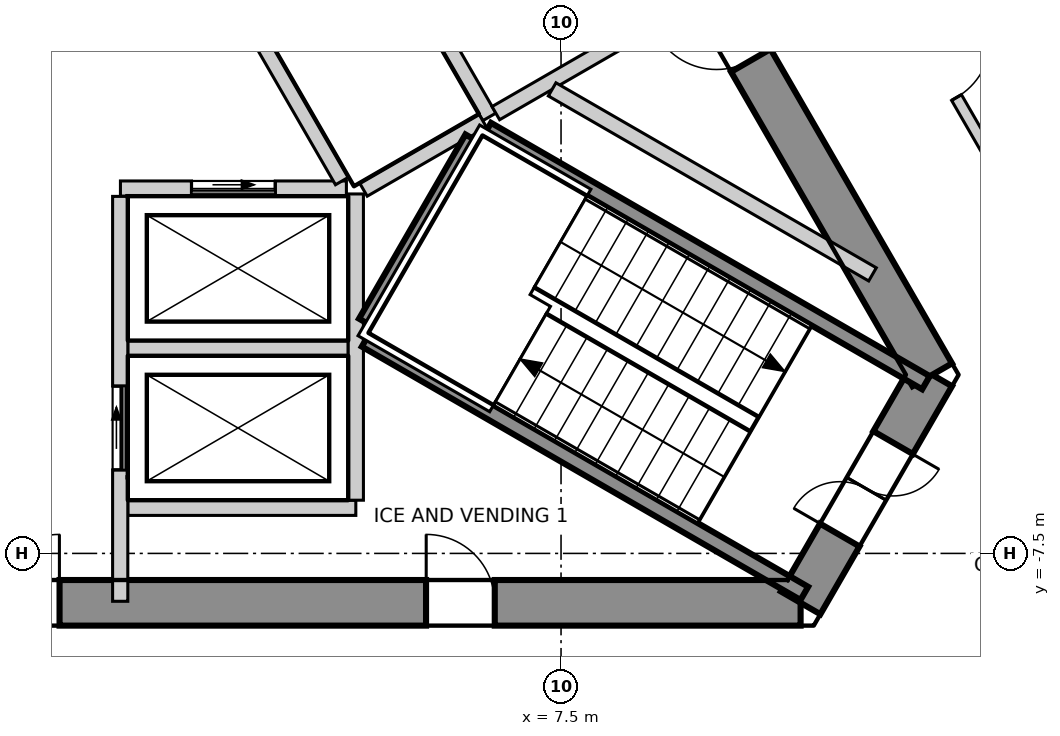
"""IFC4 building model, lengths in metres.
Left out: names, types, materials, properties, quantities, classifications, styles, units other than length and angle.
Written with IfcOpenShell. Run it as: python <this file> out.ifc"""

import sys

from ifc_helpers import new_model, si_unit, direction, frame, frame_2d, origin, place, context, subcontext, project, spatial, polyline, rectangle, outline, extrude, element, fill, save


model = new_model("IFC4")
c1 = context("Model", 3, precision=1e-05, world=origin(), true_north=direction((0.0, 1.0)))
c2 = subcontext(c1, "Body", "Model", "MODEL_VIEW")
j1 = project(units=[si_unit("LENGTHUNIT", "METRE"), si_unit("PLANEANGLEUNIT", "RADIAN")], contexts=[c1])
p1 = place(None, origin())
s1 = spatial("IfcSite", under=j1, at=p1, CompositionType="ELEMENT")
p2 = place(p1, origin())
s2 = spatial("IfcBuilding", under=s1, at=p2, CompositionType="ELEMENT")
p3 = place(p2, frame((0.0, 0.0, 300.7)))
s3 = spatial("IfcBuildingStorey", under=s2, at=p3, CompositionType="ELEMENT", Elevation=300.7)
p4 = place(p3, frame((-10.652, -8.15, -0.3), z_axis=(0.0, 0.0, 1.0), x_axis=(1.0, 0.0, 0.0)))
e1 = element("IfcWall", 1, at=p4, inside=s3, PredefinedType="SHEAR", context=c2, shape_type="SweptSolid", body=[
    extrude(outline(polyline([(-0.173, -0.3), (1.795, -0.3), (3.763, -0.3), (5.731, -0.3), (7.7, -0.3), (9.668, -0.3), (11.636, -0.3), (13.604, -0.3), (15.573, -0.3), (17.541, -0.3), (19.509, -0.3), (21.477, -0.3), (21.131, 0.3), (19.226, 0.3), (17.321, 0.3), (15.415, 0.3), (13.51, 0.3), (11.605, 0.3), (9.699, 0.3), (7.794, 0.3), (5.889, 0.3), (3.984, 0.3), (2.078, 0.3), (0.173, 0.3), (-0.173, -0.3)])), origin(), (0.0, 0.0, 1.0), 3.6),
])
p5 = place(p4, frame((9.752, 0.0, 0.3)))
e2 = element("IfcOpeningElement", 2, at=p5, cuts=e1, PredefinedType="OPENING", context=c2, shape_type="SweptSolid", body=[
    extrude(rectangle(XDim=1.8, YDim=2.1, at=frame_2d((0.9, 1.05))), frame((0.0, 0.31, 0.0), z_axis=(0.0, -1.0, 0.0), x_axis=(1.0, 0.0, 0.0)), (0.0, 0.0, 1.0), 0.62),
])
p6 = place(p4, frame((4.026, 0.0, 0.3)))
e3 = element("IfcOpeningElement", 3, at=p6, cuts=e1, PredefinedType="OPENING", context=c2, shape_type="SweptSolid", body=[
    extrude(rectangle(XDim=0.9, YDim=2.1, at=frame_2d((0.45, 1.05))), frame((0.0, 0.31, 0.0), z_axis=(0.0, -1.0, 0.0), x_axis=(1.0, 0.0, 0.0)), (0.0, 0.0, 1.0), 0.62),
])
p7 = place(p4, frame((16.378, 0.0, 0.3)))
e4 = element("IfcOpeningElement", 4, at=p7, cuts=e1, PredefinedType="OPENING", context=c2, shape_type="SweptSolid", body=[
    extrude(rectangle(XDim=0.9, YDim=2.1, at=frame_2d((0.45, 1.05))), frame((0.0, 0.31, 0.0), z_axis=(0.0, -1.0, 0.0), x_axis=(1.0, 0.0, 0.0)), (0.0, 0.0, 1.0), 0.62),
])
p8 = place(p3, frame((10.652, -8.15, -0.3), z_axis=(0.0, 0.0, 1.0), x_axis=(0.49997462182, 0.866040055388, 0.0)))
e5 = element("IfcWall", 5, at=p8, inside=s3, PredefinedType="SHEAR", context=c2, shape_type="SweptSolid", body=[
    extrude(outline(polyline([(-0.173, -0.3), (1.732, -0.301), (3.638, -0.301), (3.291, 0.3), (1.732, 0.3), (0.173, 0.3), (-0.173, -0.3)])), origin(), (0.0, 0.0, 1.0), 3.6),
])
p9 = place(p8, frame((1.032, 0.0, 0.3)))
e6 = element("IfcOpeningElement", 6, at=p9, cuts=e5, PredefinedType="OPENING", context=c2, shape_type="SweptSolid", body=[
    extrude(rectangle(XDim=1.4, YDim=2.1, at=frame_2d((0.7, 1.05))), frame((0.0, 0.31, 0.0), z_axis=(0.0, -1.0, 0.0), x_axis=(1.0, 0.0, 0.0)), (0.0, 0.0, 1.0), 0.621),
])
p10 = place(p3, frame((12.384, -5.15, -0.3), z_axis=(0.0, 0.0, 1.0), x_axis=(-0.500000539815, 0.866025092122, 0.0)))
e7 = element("IfcWall", 7, at=p10, inside=s3, PredefinedType="SHEAR", context=c2, shape_type="SweptSolid", body=[
    extrude(outline(polyline([(-0.173, -0.301), (1.795, -0.301), (3.763, -0.301), (5.731, -0.301), (7.7, -0.301), (9.668, -0.301), (11.636, -0.301), (13.604, -0.3), (15.573, -0.3), (17.541, -0.3), (19.509, -0.3), (21.477, -0.3), (21.131, 0.3), (19.226, 0.3), (17.321, 0.3), (15.415, 0.3), (13.51, 0.3), (11.605, 0.3), (9.699, 0.3), (7.794, 0.3), (5.889, 0.3), (3.984, 0.3), (2.078, 0.3), (0.173, 0.3), (-0.173, -0.301)])), origin(), (0.0, 0.0, 1.0), 3.6),
])
p11 = place(p10, frame((16.328, 0.0, 0.3)))
e8 = element("IfcOpeningElement", 8, at=p11, cuts=e7, PredefinedType="OPENING", context=c2, shape_type="SweptSolid", body=[
    extrude(rectangle(XDim=1.0, YDim=2.1, at=frame_2d((0.5, 1.05))), frame((0.0, 0.31, 0.0), z_axis=(0.0, -1.0, 0.0), x_axis=(1.0, 0.0, 0.0)), (0.0, 0.0, 1.0), 0.621),
])
p12 = place(p10, frame((4.777, 0.0, 0.3)))
e9 = element("IfcOpeningElement", 9, at=p12, cuts=e7, PredefinedType="OPENING", context=c2, shape_type="SweptSolid", body=[
    extrude(rectangle(XDim=0.9, YDim=2.1, at=frame_2d((0.45, 1.05))), frame((0.0, 0.31, 0.0), z_axis=(0.0, -1.0, 0.0), x_axis=(1.0, 0.0, 0.0)), (0.0, 0.0, 1.0), 0.621),
])
p13 = place(p3, frame((24.96, -11.578, 0.0), z_axis=(0.0, 0.0, 1.0), x_axis=(-0.500002391419, 0.866024023094, 0.0)))
e10 = element("IfcWall", 10, at=p13, inside=s3, PredefinedType="ELEMENTEDWALL", context=c2, shape_type="SweptSolid", body=[
    extrude(rectangle(XDim=44.994, YDim=0.2, at=frame_2d((22.497, 0.0))), origin(), (0.0, 0.0, 1.0), 3.3),
])
p14 = place(p13, frame((2.103, 0.0, 0.9)))
e11 = element("IfcOpeningElement", 11, at=p14, cuts=e10, PredefinedType="OPENING", context=c2, shape_type="SweptSolid", body=[
    extrude(rectangle(XDim=3.7, YDim=2.2, at=frame_2d((1.85, 1.1))), frame((0.0, 0.11, 0.0), z_axis=(0.0, -1.0, 0.0), x_axis=(1.0, 0.0, 0.0)), (0.0, 0.0, 1.0), 0.22),
])
p15 = place(p13, frame((7.404, 0.0, 0.9)))
e12 = element("IfcOpeningElement", 12, at=p15, cuts=e10, PredefinedType="OPENING", context=c2, shape_type="SweptSolid", body=[
    extrude(rectangle(XDim=3.7, YDim=2.2, at=frame_2d((1.85, 1.1))), frame((0.0, 0.11, 0.0), z_axis=(0.0, -1.0, 0.0), x_axis=(1.0, 0.0, 0.0)), (0.0, 0.0, 1.0), 0.22),
])
p16 = place(p13, frame((12.705, 0.0, 0.9)))
e13 = element("IfcOpeningElement", 13, at=p16, cuts=e10, PredefinedType="OPENING", context=c2, shape_type="SweptSolid", body=[
    extrude(rectangle(XDim=3.7, YDim=2.2, at=frame_2d((1.85, 1.1))), frame((0.0, 0.11, 0.0), z_axis=(0.0, -1.0, 0.0), x_axis=(1.0, 0.0, 0.0)), (0.0, 0.0, 1.0), 0.22),
])
p17 = place(p13, frame((18.006, 0.0, 0.9)))
e14 = element("IfcOpeningElement", 14, at=p17, cuts=e10, PredefinedType="OPENING", context=c2, shape_type="SweptSolid", body=[
    extrude(rectangle(XDim=3.7, YDim=2.2, at=frame_2d((1.85, 1.1))), frame((0.0, 0.11, 0.0), z_axis=(0.0, -1.0, 0.0), x_axis=(1.0, 0.0, 0.0)), (0.0, 0.0, 1.0), 0.22),
])
p18 = place(p13, frame((23.308, 0.0, 0.9)))
e15 = element("IfcOpeningElement", 15, at=p18, cuts=e10, PredefinedType="OPENING", context=c2, shape_type="SweptSolid", body=[
    extrude(rectangle(XDim=3.7, YDim=2.2, at=frame_2d((1.85, 1.1))), frame((0.0, 0.11, 0.0), z_axis=(0.0, -1.0, 0.0), x_axis=(1.0, 0.0, 0.0)), (0.0, 0.0, 1.0), 0.22),
])
p19 = place(p13, frame((28.609, 0.0, 0.9)))
e16 = element("IfcOpeningElement", 16, at=p19, cuts=e10, PredefinedType="OPENING", context=c2, shape_type="SweptSolid", body=[
    extrude(rectangle(XDim=3.7, YDim=2.2, at=frame_2d((1.85, 1.1))), frame((0.0, 0.11, 0.0), z_axis=(0.0, -1.0, 0.0), x_axis=(1.0, 0.0, 0.0)), (0.0, 0.0, 1.0), 0.22),
])
p20 = place(p13, frame((33.91, 0.0, 0.9)))
e17 = element("IfcOpeningElement", 17, at=p20, cuts=e10, PredefinedType="OPENING", context=c2, shape_type="SweptSolid", body=[
    extrude(rectangle(XDim=3.7, YDim=2.2, at=frame_2d((1.85, 1.1))), frame((0.0, 0.11, 0.0), z_axis=(0.0, -1.0, 0.0), x_axis=(1.0, 0.0, 0.0)), (0.0, 0.0, 1.0), 0.22),
])
p21 = place(p13, frame((39.211, 0.0, 0.9)))
e18 = element("IfcOpeningElement", 18, at=p21, cuts=e10, PredefinedType="OPENING", context=c2, shape_type="SweptSolid", body=[
    extrude(rectangle(XDim=3.7, YDim=2.2, at=frame_2d((1.85, 1.1))), frame((0.0, 0.11, 0.0), z_axis=(0.0, -1.0, 0.0), x_axis=(1.0, 0.0, 0.0)), (0.0, 0.0, 1.0), 0.22),
])
p22 = place(p3, frame((0.075, 20.37, 0.0), z_axis=(0.0, 0.0, 1.0), x_axis=(0.500009775255, -0.866019759965, 0.0)))
e19 = element("IfcWall", 19, at=p22, inside=s3, PredefinedType="PARTITIONING", context=c2, shape_type="SweptSolid", body=[
    extrude(rectangle(XDim=35.207, YDim=0.15, at=frame_2d((17.604, 0.0))), origin(), (0.0, 0.0, 1.0), 3.3),
])
p23 = place(p22, frame((31.307, 0.0, 0.0)))
e20 = element("IfcOpeningElement", 20, at=p23, cuts=e19, PredefinedType="OPENING", context=c2, shape_type="SweptSolid", body=[
    extrude(rectangle(XDim=1.0, YDim=2.1, at=frame_2d((0.5, 1.05))), frame((0.0, 0.085, 0.0), z_axis=(0.0, -1.0, 0.0), x_axis=(1.0, 0.0, 0.0)), (0.0, 0.0, 1.0), 0.17),
])
p24 = place(p22, frame((20.355, 0.0, 0.0)))
e21 = element("IfcOpeningElement", 21, at=p24, cuts=e19, PredefinedType="OPENING", context=c2, shape_type="SweptSolid", body=[
    extrude(rectangle(XDim=1.0, YDim=2.1, at=frame_2d((0.5, 1.05))), frame((0.0, 0.085, 0.0), z_axis=(0.0, -1.0, 0.0), x_axis=(1.0, 0.0, 0.0)), (0.0, 0.0, 1.0), 0.17),
])
p25 = place(p22, frame((24.355, 0.0, 0.0)))
e22 = element("IfcOpeningElement", 22, at=p25, cuts=e19, PredefinedType="OPENING", context=c2, shape_type="SweptSolid", body=[
    extrude(rectangle(XDim=0.9, YDim=2.1, at=frame_2d((0.45, 1.05))), frame((0.0, 0.085, 0.0), z_axis=(0.0, -1.0, 0.0), x_axis=(1.0, 0.0, 0.0)), (0.0, 0.0, 1.0), 0.17),
])
p26 = place(p22, frame((22.255, 0.0, 0.0)))
e23 = element("IfcOpeningElement", 23, at=p26, cuts=e19, PredefinedType="OPENING", context=c2, shape_type="SweptSolid", body=[
    extrude(rectangle(XDim=0.9, YDim=2.1, at=frame_2d((0.45, 1.05))), frame((0.0, 0.085, 0.0), z_axis=(0.0, -1.0, 0.0), x_axis=(1.0, 0.0, 0.0)), (0.0, 0.0, 1.0), 0.17),
])
p27 = place(p22, frame((8.453, 0.0, 0.0)))
e24 = element("IfcOpeningElement", 24, at=p27, cuts=e19, PredefinedType="OPENING", context=c2, shape_type="SweptSolid", body=[
    extrude(rectangle(XDim=1.0, YDim=2.1, at=frame_2d((0.5, 1.05))), frame((0.0, 0.085, 0.0), z_axis=(0.0, -1.0, 0.0), x_axis=(1.0, 0.0, 0.0)), (0.0, 0.0, 1.0), 0.17),
])
p28 = place(p22, frame((13.753, 0.0, 0.0)))
e25 = element("IfcOpeningElement", 25, at=p28, cuts=e19, PredefinedType="OPENING", context=c2, shape_type="SweptSolid", body=[
    extrude(rectangle(XDim=0.9, YDim=2.1, at=frame_2d((0.45, 1.05))), frame((0.0, 0.085, 0.0), z_axis=(0.0, -1.0, 0.0), x_axis=(1.0, 0.0, 0.0)), (0.0, 0.0, 1.0), 0.17),
])
p29 = place(p22, frame((11.553, 0.0, 0.0)))
e26 = element("IfcOpeningElement", 26, at=p29, cuts=e19, PredefinedType="OPENING", context=c2, shape_type="SweptSolid", body=[
    extrude(rectangle(XDim=0.9, YDim=2.1, at=frame_2d((0.45, 1.05))), frame((0.0, 0.085, 0.0), z_axis=(0.0, -1.0, 0.0), x_axis=(1.0, 0.0, 0.0)), (0.0, 0.0, 1.0), 0.17),
])
p30 = place(p22, frame((2.951, 0.0, 0.0)))
e27 = element("IfcOpeningElement", 27, at=p30, cuts=e19, PredefinedType="OPENING", context=c2, shape_type="SweptSolid", body=[
    extrude(rectangle(XDim=1.0, YDim=2.1, at=frame_2d((0.5, 1.05))), frame((0.0, 0.085, 0.0), z_axis=(0.0, -1.0, 0.0), x_axis=(1.0, 0.0, 0.0)), (0.0, 0.0, 1.0), 0.17),
])
p31 = place(p3, frame((1.8, -4.8, 0.0), z_axis=(0.0, 0.0, 1.0), x_axis=(1.0, 0.0, 0.0)))
e28 = element("IfcWall", 28, at=p31, inside=s3, PredefinedType="SOLIDWALL", context=c2, shape_type="SweptSolid", body=[
    extrude(rectangle(XDim=2.9, YDim=0.2, at=frame_2d((1.45, 0.0))), origin(), (0.0, 0.0, 1.0), 3.3),
])
p32 = place(p3, frame((1.8, -6.9, 0.0), z_axis=(0.0, 0.0, 1.0), x_axis=(1.0, 0.0, 0.0)))
e29 = element("IfcWall", 29, at=p32, inside=s3, PredefinedType="SOLIDWALL", context=c2, shape_type="SweptSolid", body=[
    extrude(rectangle(XDim=3.0, YDim=0.2, at=frame_2d((1.5, 0.0))), origin(), (0.0, 0.0, 1.0), 3.3),
])
p33 = place(p3, frame((1.703, -2.7, 0.0), z_axis=(0.0, 0.0, 1.0), x_axis=(1.0, 0.0, 0.0)))
e30 = element("IfcWall", 30, at=p33, inside=s3, PredefinedType="SOLIDWALL", context=c2, shape_type="SweptSolid", body=[
    extrude(rectangle(XDim=2.973, YDim=0.2, at=frame_2d((1.487, 0.0))), origin(), (0.0, 0.0, 1.0), 3.3),
])
p34 = place(p33, frame((0.936, 0.0, 0.0)))
e31 = element("IfcOpeningElement", 31, at=p34, cuts=e30, PredefinedType="OPENING", context=c2, shape_type="SweptSolid", body=[
    extrude(rectangle(XDim=1.1, YDim=2.1, at=frame_2d((0.55, 1.05))), frame((0.0, 0.11, 0.0), z_axis=(0.0, -1.0, 0.0), x_axis=(1.0, 0.0, 0.0)), (0.0, 0.0, 1.0), 0.22),
])
p35 = place(p3, frame((3.19, -0.125, 0.0), z_axis=(0.0, 0.0, 1.0), x_axis=(0.499988658015, -0.866031951983, 0.0)))
e32 = element("IfcWall", 32, at=p35, inside=s3, PredefinedType="SOLIDWALL", context=c2, shape_type="SweptSolid", body=[
    extrude(rectangle(XDim=2.858, YDim=0.2, at=frame_2d((1.429, 0.0))), origin(), (0.0, 0.0, 1.0), 3.3),
])
p36 = place(p3, frame((1.7, -8.13, 0.0), z_axis=(0.0, 0.0, 1.0), x_axis=(0.0, 1.0, 0.0)))
e33 = element("IfcWall", 33, at=p36, inside=s3, PredefinedType="SOLIDWALL", context=c2, shape_type="SweptSolid", body=[
    extrude(rectangle(XDim=5.327, YDim=0.2, at=frame_2d((2.664, 0.0))), origin(), (0.0, 0.0, 1.0), 3.3),
])
p37 = place(p36, frame((1.73, 0.0, 0.0)))
e34 = element("IfcOpeningElement", 34, at=p37, cuts=e33, PredefinedType="OPENING", context=c2, shape_type="SweptSolid", body=[
    extrude(rectangle(XDim=1.1, YDim=2.1, at=frame_2d((0.55, 1.05))), frame((0.0, 0.11, 0.0), z_axis=(0.0, -1.0, 0.0), x_axis=(1.0, 0.0, 0.0)), (0.0, 0.0, 1.0), 0.22),
])
p38 = place(p3, frame((4.8, -6.8, 0.0), z_axis=(0.0, 0.0, 1.0), x_axis=(0.0, 1.0, 0.0)))
e35 = element("IfcWall", 35, at=p38, inside=s3, PredefinedType="SOLIDWALL", context=c2, shape_type="SweptSolid", body=[
    extrude(rectangle(XDim=4.029, YDim=0.2, at=frame_2d((2.015, 0.0))), origin(), (0.0, 0.0, 1.0), 3.3),
])
p39 = place(p3, frame((5.057, 0.841, 0.0), z_axis=(0.0, 0.0, 1.0), x_axis=(0.499990139034, -0.866031096941, 0.0)))
e36 = element("IfcWall", 36, at=p39, inside=s3, PredefinedType="SOLIDWALL", context=c2, shape_type="SweptSolid", body=[
    extrude(rectangle(XDim=3.0, YDim=0.2, at=frame_2d((1.5, 0.0))), origin(), (0.0, 0.0, 1.0), 3.3),
])
p40 = place(p3, frame((4.9, -2.714, 0.0), z_axis=(0.0, 0.0, 1.0), x_axis=(0.865846928409, 0.500309001083, 0.0)))
e37 = element("IfcWall", 37, at=p40, inside=s3, PredefinedType="SOLIDWALL", context=c2, shape_type="SweptSolid", body=[
    extrude(rectangle(XDim=1.813, YDim=0.2, at=frame_2d((0.907, 0.0))), origin(), (0.0, 0.0, 1.0), 3.3),
])
p41 = place(p3, frame((6.642, -1.708, 0.0), z_axis=(0.0, 0.0, 1.0), x_axis=(0.866043441391, 0.499968756647, 0.0)))
e38 = element("IfcWall", 38, at=p41, inside=s3, PredefinedType="SOLIDWALL", context=c2, shape_type="SweptSolid", body=[
    extrude(rectangle(XDim=2.002, YDim=0.2, at=frame_2d((1.001, 0.0))), origin(), (0.0, 0.0, 1.0), 3.3),
])
p42 = place(p3, frame((7.383, -1.395, 0.0), z_axis=(0.0, 0.0, 1.0), x_axis=(0.865968383994, -0.500098748171, 0.0)))
e39 = element("IfcWall", 39, at=p42, inside=s3, PredefinedType="SOLIDWALL", context=c2, shape_type="SweptSolid", body=[
    extrude(rectangle(XDim=4.867, YDim=0.2, at=frame_2d((2.434, 0.0))), origin(), (0.0, 0.0, 1.0), 3.3),
])
p43 = place(p3, frame((4.929, -4.693, 0.0), z_axis=(0.0, 0.0, 1.0), x_axis=(0.866005022404, -0.500035299925, 0.0)))
e40 = element("IfcWall", 40, at=p43, inside=s3, PredefinedType="SOLIDWALL", context=c2, shape_type="SweptSolid", body=[
    extrude(rectangle(XDim=6.665, YDim=0.2, at=frame_2d((3.333, 0.0))), origin(), (0.0, 0.0, 1.0), 3.3),
])
p44 = place(p3, frame((4.929, -4.462, 0.0), z_axis=(0.0, 0.0, 1.0), x_axis=(0.500200581029, 0.865909567298, 0.0)))
e41 = element("IfcWall", 41, at=p44, inside=s3, PredefinedType="SOLIDWALL", context=c2, shape_type="SweptSolid", body=[
    extrude(rectangle(XDim=2.799, YDim=0.2, at=frame_2d((1.399, 0.0))), origin(), (0.0, 0.0, 1.0), 3.3),
])
p45 = place(p3, frame((6.529, -1.922, 0.0), z_axis=(0.0, 0.0, 1.0), x_axis=(0.866068467981, -0.499925403204, 0.0)))
e42 = element("IfcWall", 42, at=p45, inside=s3, PredefinedType="SOLIDWALL", context=c2, shape_type="SweptSolid", body=[
    extrude(rectangle(XDim=6.665, YDim=0.2, at=frame_2d((3.332, 0.0))), origin(), (0.0, 0.0, 1.0), 3.3),
])
p46 = place(p34, origin())
e43 = element("IfcDoor", 43, at=p46, inside=s3, OperationType="SLIDING_TO_LEFT", PredefinedType="DOOR", context=c2, shape_type="SweptSolid", body=[
    extrude(rectangle(XDim=1.1, YDim=2.1, at=frame_2d((0.55, 1.05))), frame((0.0, 0.025, 0.0), z_axis=(0.0, -1.0, 0.0), x_axis=(1.0, 0.0, 0.0)), (0.0, 0.0, 1.0), 0.05),
])
fill(e31, e43)
p47 = place(p37, origin())
e44 = element("IfcDoor", 44, at=p47, inside=s3, OperationType="SLIDING_TO_LEFT", PredefinedType="DOOR", context=c2, shape_type="SweptSolid", body=[
    extrude(rectangle(XDim=1.1, YDim=2.1, at=frame_2d((0.55, 1.05))), frame((0.0, 0.025, 0.0), z_axis=(0.0, -1.0, 0.0), x_axis=(1.0, 0.0, 0.0)), (0.0, 0.0, 1.0), 0.05),
])
fill(e34, e44)
p48 = place(p25, origin())
e45 = element("IfcDoor", 45, at=p48, inside=s3, OperationType="SINGLE_SWING_RIGHT", PredefinedType="DOOR", context=c2, shape_type="SweptSolid", body=[
    extrude(rectangle(XDim=0.9, YDim=2.1, at=frame_2d((0.45, 1.05))), frame((0.0, 0.025, 0.0), z_axis=(0.0, -1.0, 0.0), x_axis=(1.0, 0.0, 0.0)), (0.0, 0.0, 1.0), 0.05),
])
fill(e22, e45)
p49 = place(p5, origin())
e46 = element("IfcDoor", 46, at=p49, inside=s3, OperationType="DOUBLE_DOOR_SINGLE_SWING", PredefinedType="DOOR", context=c2, shape_type="SweptSolid", body=[
    extrude(rectangle(XDim=1.8, YDim=2.1, at=frame_2d((0.9, 1.05))), frame((0.0, 0.025, 0.0), z_axis=(0.0, -1.0, 0.0), x_axis=(1.0, 0.0, 0.0)), (0.0, 0.0, 1.0), 0.05),
])
fill(e2, e46)
p50 = place(p9, origin())
e47 = element("IfcDoor", 47, at=p50, inside=s3, OperationType="DOUBLE_DOOR_SINGLE_SWING", PredefinedType="DOOR", context=c2, shape_type="SweptSolid", body=[
    extrude(rectangle(XDim=1.4, YDim=2.1, at=frame_2d((0.7, 1.05))), frame((0.0, 0.025, 0.0), z_axis=(0.0, -1.0, 0.0), x_axis=(1.0, 0.0, 0.0)), (0.0, 0.0, 1.0), 0.05),
])
fill(e6, e47)
p51 = place(p7, origin())
e48 = element("IfcDoor", 48, at=p51, inside=s3, OperationType="SINGLE_SWING_RIGHT", PredefinedType="DOOR", context=c2, shape_type="SweptSolid", body=[
    extrude(rectangle(XDim=0.9, YDim=2.1, at=frame_2d((0.45, 1.05))), frame((0.0, 0.025, 0.0), z_axis=(0.0, -1.0, 0.0), x_axis=(1.0, 0.0, 0.0)), (0.0, 0.0, 1.0), 0.05),
])
fill(e4, e48)
p52 = place(p12, origin())
e49 = element("IfcDoor", 49, at=p52, inside=s3, OperationType="SINGLE_SWING_LEFT", PredefinedType="DOOR", context=c2, shape_type="SweptSolid", body=[
    extrude(rectangle(XDim=0.9, YDim=2.1, at=frame_2d((0.45, 1.05))), frame((0.0, 0.025, 0.0), z_axis=(0.0, -1.0, 0.0), x_axis=(1.0, 0.0, 0.0)), (0.0, 0.0, 1.0), 0.05),
])
fill(e9, e49)
save(model, sys.argv[1])
